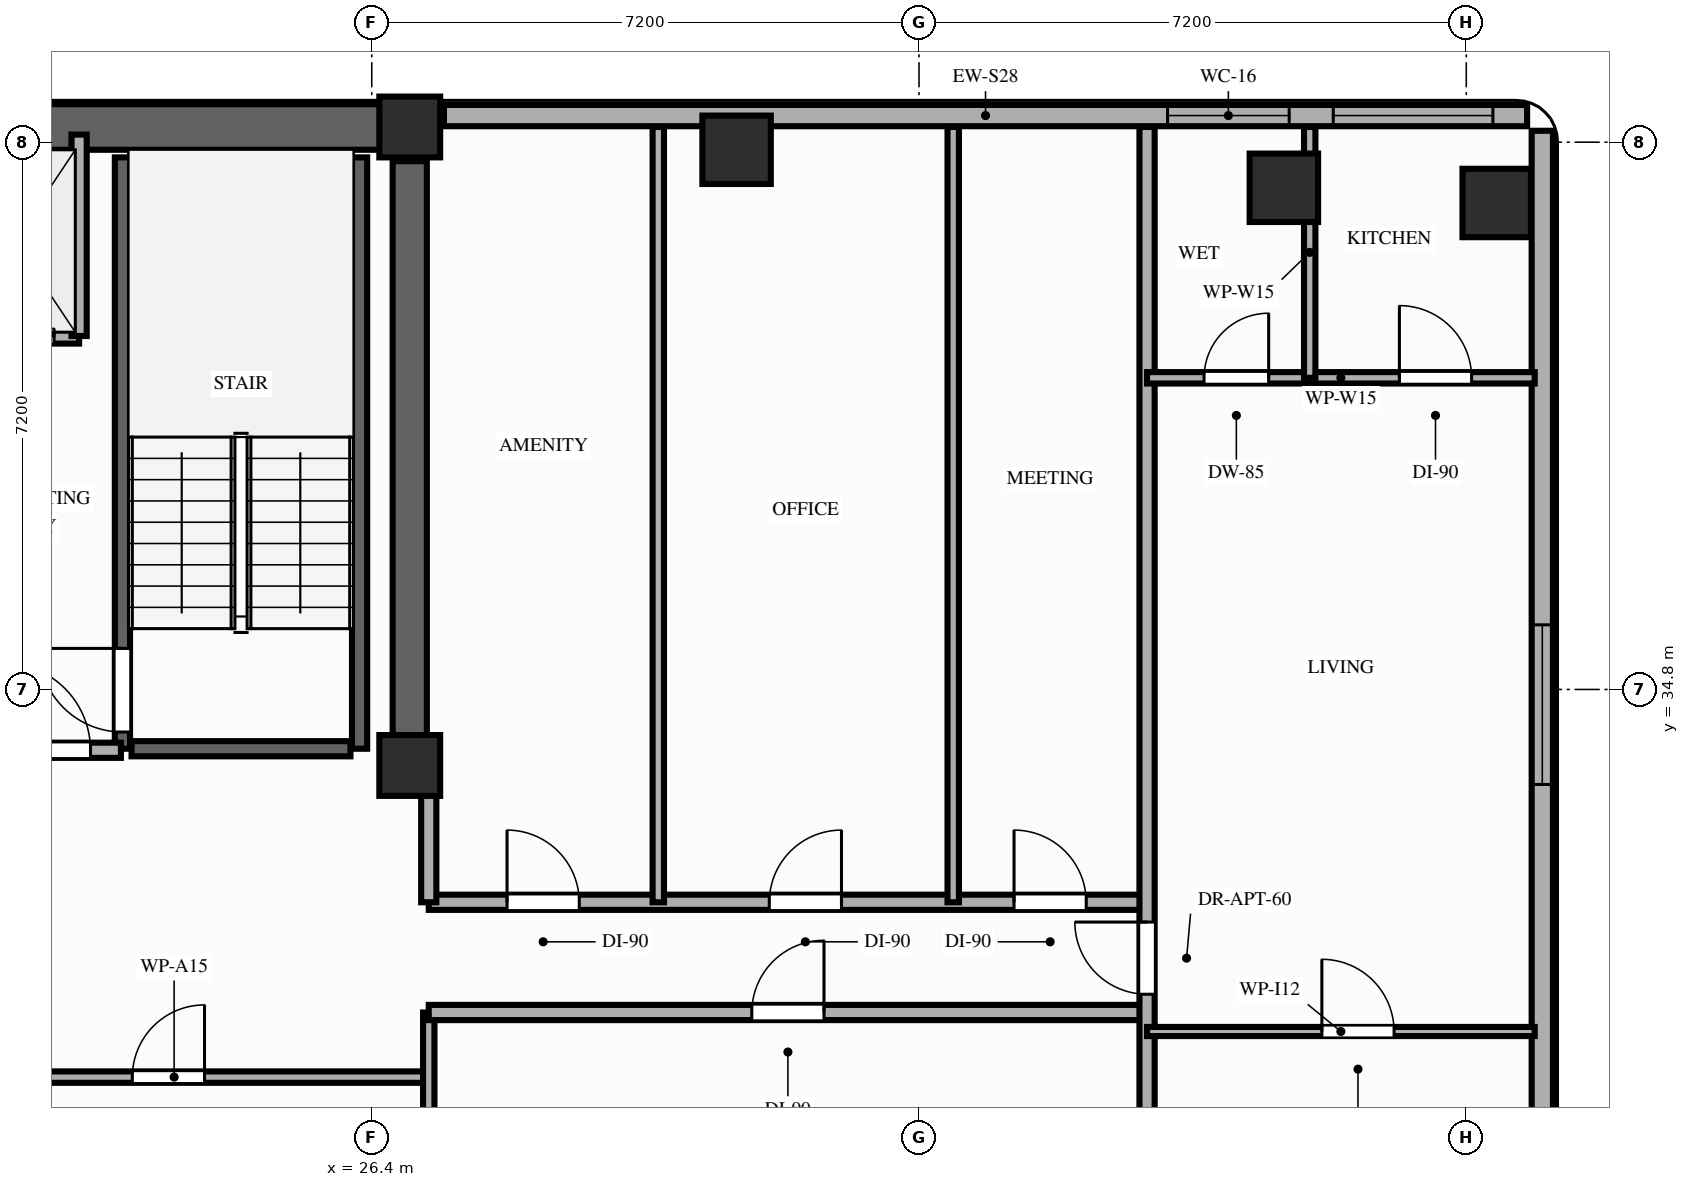
"""IFC4 building model, lengths in metres.
Left out: names, types, materials, properties, quantities, classifications, styles, units other than length and angle.
Written with IfcOpenShell. Run it as: python <this file> out.ifc"""

import sys

from ifc_helpers import new_model, si_unit, direction, frame, frame_2d, origin, origin_2d, place, context, subcontext, project, spatial, rectangle, extrude, element, fill, save


model = new_model("IFC4")
c1 = context("Model", 3, precision=1e-05, world=origin(), true_north=direction((0.0, 1.0)))
c2 = subcontext(c1, "Body", "Model", "MODEL_VIEW")
j1 = project(units=[si_unit("LENGTHUNIT", "METRE"), si_unit("PLANEANGLEUNIT", "RADIAN")], contexts=[c1])
p1 = place(None, origin())
s1 = spatial("IfcSite", under=j1, at=p1, CompositionType="ELEMENT")
p2 = place(p1, origin())
s2 = spatial("IfcBuilding", under=s1, at=p2, CompositionType="ELEMENT")
p3 = place(p2, frame((0.0, 0.0, 198.4)))
s3 = spatial("IfcBuildingStorey", under=s2, at=p3, CompositionType="ELEMENT", Elevation=198.4)
for number, where, z_axis, x_axis in (
    (1, (26.9, 33.8, 0.0), (0.0, 0.0, 1.0), (1.0, 0.0, 0.0)),
    (2, (26.9, 42.2, 0.0), (0.0, 0.0, 1.0), (1.0, 0.0, 0.0)),
):
    element("IfcColumn", number, at=place(p3, frame(where, z_axis=z_axis, x_axis=x_axis)), inside=s3, PredefinedType="COLUMN", context=c2, shape_type="SweptSolid", body=[
        extrude(rectangle(XDim=0.8, YDim=0.8, at=origin_2d()), origin(), (0.0, 0.0, 1.0), 3.2),
    ])
for number, where, z_axis, x_axis in (
    (3, (31.2, 41.9, 0.0), (0.0, 0.0, 1.0), (1.0, 0.0, 0.0)),
    (4, (38.4, 41.4, 0.0), (0.0, 0.0, 1.0), (1.0, 0.0, 0.0)),
    (5, (41.2, 41.2, 0.0), (0.0, 0.0, 1.0), (1.0, 0.0, 0.0)),
):
    element("IfcColumn", number, at=place(p3, frame(where, z_axis=z_axis, x_axis=x_axis)), inside=s3, PredefinedType="COLUMN", context=c2, shape_type="SweptSolid", body=[
        extrude(rectangle(XDim=0.9, YDim=0.9, at=origin_2d()), origin(), (0.0, 0.0, 1.0), 3.2),
    ])
p4 = place(p3, frame((41.6, 42.35, 0.0), z_axis=(0.0, 0.0, 1.0), x_axis=(-1.0, 0.0, 0.0)))
e6 = element("IfcWall", 6, at=p4, inside=s3, PredefinedType="STANDARD", context=c2, shape_type="SweptSolid", body=[
    extrude(rectangle(XDim=14.25, YDim=0.28, at=frame_2d((7.125, 0.0))), origin(), (0.0, 0.0, 1.0), 2.51),
])
p5 = place(p4, frame((3.13, 0.0, 0.85)))
e7 = element("IfcOpeningElement", 7, at=p5, cuts=e6, PredefinedType="OPENING", context=c2, shape_type="SweptSolid", body=[
    extrude(rectangle(XDim=1.6, YDim=1.41, at=frame_2d((0.8, 0.705))), frame((0.0, 0.15, 0.0), z_axis=(0.0, -1.0, 0.0), x_axis=(1.0, 0.0, 0.0)), (0.0, 0.0, 1.0), 0.3),
])
p6 = place(p4, frame((0.45, 0.0, 0.85)))
e8 = element("IfcOpeningElement", 8, at=p6, cuts=e6, PredefinedType="OPENING", context=c2, shape_type="SweptSolid", body=[
    extrude(rectangle(XDim=2.1, YDim=1.41, at=frame_2d((1.05, 0.705))), frame((0.0, 0.15, 0.0), z_axis=(0.0, -1.0, 0.0), x_axis=(1.0, 0.0, 0.0)), (0.0, 0.0, 1.0), 0.3),
])
p7 = place(p3, frame((41.8, 26.8, 0.0), z_axis=(0.0, 0.0, 1.0), x_axis=(0.0, 1.0, 0.0)))
e9 = element("IfcWall", 9, at=p7, inside=s3, PredefinedType="STANDARD", context=c2, shape_type="SweptSolid", body=[
    extrude(rectangle(XDim=15.35, YDim=0.28, at=frame_2d((7.675, 0.0))), origin(), (0.0, 0.0, 1.0), 3.02),
])
p8 = place(p7, frame((6.75, 0.0, 0.85)))
e10 = element("IfcOpeningElement", 10, at=p8, cuts=e9, PredefinedType="OPENING", context=c2, shape_type="SweptSolid", body=[
    extrude(rectangle(XDim=2.1, YDim=1.8, at=frame_2d((1.05, 0.9))), frame((0.0, 0.15, 0.0), z_axis=(0.0, -1.0, 0.0), x_axis=(1.0, 0.0, 0.0)), (0.0, 0.0, 1.0), 0.3),
])
p9 = place(p3, frame((6.45, 42.2, 0.0), z_axis=(0.0, 0.0, 1.0), x_axis=(1.0, 0.0, 0.0)))
e11 = element("IfcWall", 11, at=p9, inside=s3, PredefinedType="SHEAR", context=c2, shape_type="SweptSolid", body=[
    extrude(rectangle(XDim=20.45, YDim=0.6, at=frame_2d((10.225, 0.0))), origin(), (0.0, 0.0, 1.0), 3.02),
])
p10 = place(p3, frame((26.9, 33.8, 0.0), z_axis=(0.0, 0.0, 1.0), x_axis=(0.0, 1.0, 0.0)))
e12 = element("IfcWall", 12, at=p10, inside=s3, PredefinedType="SHEAR", context=c2, shape_type="SweptSolid", body=[
    extrude(rectangle(XDim=7.95, YDim=0.45, at=frame_2d((3.975, 0.0))), origin(), (0.0, 0.0, 1.0), 3.02),
])
p11 = place(p3, frame((23.12, 34.02, 0.0), z_axis=(0.0, 0.0, 1.0), x_axis=(0.0, 1.0, 0.0)))
e13 = element("IfcWall", 13, at=p11, inside=s3, PredefinedType="SHEAR", context=c2, shape_type="SweptSolid", body=[
    extrude(rectangle(XDim=7.78, YDim=0.2, at=frame_2d((3.89, 0.0))), origin(), (0.0, 0.0, 1.0), 3.02),
])
p12 = place(p11, frame((0.22, 0.0, 0.0)))
e14 = element("IfcOpeningElement", 14, at=p12, cuts=e13, PredefinedType="OPENING", context=c2, shape_type="SweptSolid", body=[
    extrude(rectangle(XDim=1.1, YDim=2.15, at=frame_2d((0.55, 1.075))), frame((0.0, 0.11, 0.0), z_axis=(0.0, -1.0, 0.0), x_axis=(1.0, 0.0, 0.0)), (0.0, 0.0, 1.0), 0.22),
])
p13 = place(p3, frame((26.24, 34.02, 0.0), z_axis=(0.0, 0.0, 1.0), x_axis=(0.0, 1.0, 0.0)))
e15 = element("IfcWall", 15, at=p13, inside=s3, PredefinedType="SHEAR", context=c2, shape_type="SweptSolid", body=[
    extrude(rectangle(XDim=7.78, YDim=0.2, at=frame_2d((3.89, 0.0))), origin(), (0.0, 0.0, 1.0), 3.02),
])
p14 = place(p3, frame((23.24, 34.02, 0.0), z_axis=(0.0, 0.0, 1.0), x_axis=(1.0, 0.0, 0.0)))
e16 = element("IfcWall", 16, at=p14, inside=s3, PredefinedType="SHEAR", context=c2, shape_type="SweptSolid", body=[
    extrude(rectangle(XDim=2.88, YDim=0.2, at=frame_2d((1.44, 0.0))), origin(), (0.0, 0.0, 1.0), 3.02),
])
p15 = place(p3, frame((20.85, 39.45, 0.0), z_axis=(0.0, 0.0, 1.0), x_axis=(1.0, 0.0, 0.0)))
e17 = element("IfcWall", 17, at=p15, inside=s3, PredefinedType="MOVABLE", context=c2, shape_type="SweptSolid", body=[
    extrude(rectangle(XDim=1.7, YDim=0.2, at=frame_2d((0.85, 0.0))), origin(), (0.0, 0.0, 1.0), 3.02),
])
p16 = place(p15, frame((0.32, 0.0, 0.0)))
e18 = element("IfcOpeningElement", 18, at=p16, cuts=e17, PredefinedType="OPENING", context=c2, shape_type="SweptSolid", body=[
    extrude(rectangle(XDim=1.05, YDim=2.15, at=frame_2d((0.525, 1.075))), frame((0.0, 0.11, 0.0), z_axis=(0.0, -1.0, 0.0), x_axis=(1.0, 0.0, 0.0)), (0.0, 0.0, 1.0), 0.22),
])
p17 = place(p3, frame((22.55, 39.45, 0.0), z_axis=(0.0, 0.0, 1.0), x_axis=(0.0, 1.0, 0.0)))
e19 = element("IfcWall", 19, at=p17, inside=s3, PredefinedType="MOVABLE", context=c2, shape_type="SweptSolid", body=[
    extrude(rectangle(XDim=2.65, YDim=0.2, at=frame_2d((1.325, 0.0))), origin(), (0.0, 0.0, 1.0), 2.51),
])
p18 = place(p3, frame((20.5, 34.0, 0.0), z_axis=(0.0, 0.0, 1.0), x_axis=(1.0, 0.0, 0.0)))
e20 = element("IfcWall", 20, at=p18, inside=s3, PredefinedType="PARTITIONING", context=c2, shape_type="SweptSolid", body=[
    extrude(rectangle(XDim=2.6, YDim=0.2, at=frame_2d((1.3, 0.0))), origin(), (0.0, 0.0, 1.0), 2.51),
])
p19 = place(p18, frame((1.05, 0.0, 0.0)))
e21 = element("IfcOpeningElement", 21, at=p19, cuts=e20, PredefinedType="OPENING", context=c2, shape_type="SweptSolid", body=[
    extrude(rectangle(XDim=1.15, YDim=2.15, at=frame_2d((0.575, 1.075))), frame((0.0, 0.11, 0.0), z_axis=(0.0, -1.0, 0.0), x_axis=(1.0, 0.0, 0.0)), (0.0, 0.0, 1.0), 0.22),
])
p20 = place(p3, frame((20.45, 29.7, 0.0), z_axis=(0.0, 0.0, 1.0), x_axis=(1.0, 0.0, 0.0)))
e22 = element("IfcWall", 22, at=p20, inside=s3, PredefinedType="PARTITIONING", context=c2, shape_type="SweptSolid", body=[
    extrude(rectangle(XDim=6.7, YDim=0.15, at=frame_2d((3.35, 0.0))), origin(), (0.0, 0.0, 1.0), 3.02),
])
p21 = place(p20, frame((2.8, 0.0, 0.0)))
e23 = element("IfcOpeningElement", 23, at=p21, cuts=e22, PredefinedType="OPENING", context=c2, shape_type="SweptSolid", body=[
    extrude(rectangle(XDim=0.95, YDim=2.15, at=frame_2d((0.475, 1.075))), frame((0.0, 0.085, 0.0), z_axis=(0.0, -1.0, 0.0), x_axis=(1.0, 0.0, 0.0)), (0.0, 0.0, 1.0), 0.17),
])
p22 = place(p3, frame((27.15, 26.75, 0.0), z_axis=(0.0, 0.0, 1.0), x_axis=(0.0, 1.0, 0.0)))
e24 = element("IfcWall", 24, at=p22, inside=s3, PredefinedType="PARTITIONING", context=c2, shape_type="SweptSolid", body=[
    extrude(rectangle(XDim=3.8, YDim=0.15, at=frame_2d((1.9, 0.0))), origin(), (0.0, 0.0, 1.0), 2.51),
])
p23 = place(p3, frame((27.15, 30.55, 0.0), z_axis=(0.0, 0.0, 1.0), x_axis=(1.0, 0.0, 0.0)))
e25 = element("IfcWall", 25, at=p23, inside=s3, PredefinedType="PARTITIONING", context=c2, shape_type="SweptSolid", body=[
    extrude(rectangle(XDim=9.45, YDim=0.2, at=frame_2d((4.725, 0.0))), origin(), (0.0, 0.0, 1.0), 2.51),
])
p24 = place(p23, frame((4.25, 0.0, 0.0)))
e26 = element("IfcOpeningElement", 26, at=p24, cuts=e25, PredefinedType="OPENING", context=c2, shape_type="SweptSolid", body=[
    extrude(rectangle(XDim=0.95, YDim=2.15, at=frame_2d((0.475, 1.075))), frame((0.0, 0.11, 0.0), z_axis=(0.0, -1.0, 0.0), x_axis=(1.0, 0.0, 0.0)), (0.0, 0.0, 1.0), 0.22),
])
p25 = place(p3, frame((27.15, 32.0, 0.0), z_axis=(0.0, 0.0, 1.0), x_axis=(1.0, 0.0, 0.0)))
e27 = element("IfcWall", 27, at=p25, inside=s3, PredefinedType="PARTITIONING", context=c2, shape_type="SweptSolid", body=[
    extrude(rectangle(XDim=9.45, YDim=0.2, at=frame_2d((4.725, 0.0))), origin(), (0.0, 0.0, 1.0), 2.51),
])
p26 = place(p25, frame((1.03, 0.0, 0.0)))
e28 = element("IfcOpeningElement", 28, at=p26, cuts=e27, PredefinedType="OPENING", context=c2, shape_type="SweptSolid", body=[
    extrude(rectangle(XDim=0.95, YDim=2.15, at=frame_2d((0.475, 1.075))), frame((0.0, 0.11, 0.0), z_axis=(0.0, -1.0, 0.0), x_axis=(1.0, 0.0, 0.0)), (0.0, 0.0, 1.0), 0.22),
])
p27 = place(p25, frame((4.48, 0.0, 0.0)))
e29 = element("IfcOpeningElement", 29, at=p27, cuts=e27, PredefinedType="OPENING", context=c2, shape_type="SweptSolid", body=[
    extrude(rectangle(XDim=0.95, YDim=2.15, at=frame_2d((0.475, 1.075))), frame((0.0, 0.11, 0.0), z_axis=(0.0, -1.0, 0.0), x_axis=(1.0, 0.0, 0.0)), (0.0, 0.0, 1.0), 0.22),
])
p28 = place(p25, frame((7.7, 0.0, 0.0)))
e30 = element("IfcOpeningElement", 30, at=p28, cuts=e27, PredefinedType="OPENING", context=c2, shape_type="SweptSolid", body=[
    extrude(rectangle(XDim=0.95, YDim=2.15, at=frame_2d((0.475, 1.075))), frame((0.0, 0.11, 0.0), z_axis=(0.0, -1.0, 0.0), x_axis=(1.0, 0.0, 0.0)), (0.0, 0.0, 1.0), 0.22),
])
p29 = place(p3, frame((27.15, 32.0, 0.0), z_axis=(0.0, 0.0, 1.0), x_axis=(0.0, 1.0, 0.0)))
e31 = element("IfcWall", 31, at=p29, inside=s3, PredefinedType="PARTITIONING", context=c2, shape_type="SweptSolid", body=[
    extrude(rectangle(XDim=1.68, YDim=0.2, at=frame_2d((0.84, 0.0))), origin(), (0.0, 0.0, 1.0), 2.51),
])
p30 = place(p3, frame((36.6, 26.75, 0.0), z_axis=(0.0, 0.0, 1.0), x_axis=(0.0, 1.0, 0.0)))
e32 = element("IfcWall", 32, at=p30, inside=s3, PredefinedType="PARTITIONING", context=c2, shape_type="SweptSolid", body=[
    extrude(rectangle(XDim=15.45, YDim=0.2, at=frame_2d((7.725, 0.0))), origin(), (0.0, 0.0, 1.0), 2.51),
])
p31 = place(p30, frame((4.04, 0.0, 0.0)))
e33 = element("IfcOpeningElement", 33, at=p31, cuts=e32, PredefinedType="OPENING", context=c2, shape_type="SweptSolid", body=[
    extrude(rectangle(XDim=0.95, YDim=2.15, at=frame_2d((0.475, 1.075))), frame((0.0, 0.11, 0.0), z_axis=(0.0, -1.0, 0.0), x_axis=(1.0, 0.0, 0.0)), (0.0, 0.0, 1.0), 0.22),
])
p32 = place(p3, frame((36.6, 30.3, 0.0), z_axis=(0.0, 0.0, 1.0), x_axis=(1.0, 0.0, 0.0)))
e34 = element("IfcWall", 34, at=p32, inside=s3, PredefinedType="PARTITIONING", context=c2, shape_type="SweptSolid", body=[
    extrude(rectangle(XDim=5.1, YDim=0.12, at=frame_2d((2.55, 0.0))), origin(), (0.0, 0.0, 1.0), 2.51),
])
p33 = place(p32, frame((2.3, 0.0, 0.0)))
e35 = element("IfcOpeningElement", 35, at=p33, cuts=e34, PredefinedType="OPENING", context=c2, shape_type="SweptSolid", body=[
    extrude(rectangle(XDim=0.95, YDim=2.15, at=frame_2d((0.475, 1.075))), frame((0.0, 0.07, 0.0), z_axis=(0.0, -1.0, 0.0), x_axis=(1.0, 0.0, 0.0)), (0.0, 0.0, 1.0), 0.14),
])
p34 = place(p3, frame((36.6, 38.9, 0.0), z_axis=(0.0, 0.0, 1.0), x_axis=(1.0, 0.0, 0.0)))
e36 = element("IfcWall", 36, at=p34, inside=s3, PredefinedType="PARTITIONING", context=c2, shape_type="SweptSolid", body=[
    extrude(rectangle(XDim=5.1, YDim=0.15, at=frame_2d((2.55, 0.0))), origin(), (0.0, 0.0, 1.0), 2.51),
])
p35 = place(p34, frame((0.75, 0.0, 0.0)))
e37 = element("IfcOpeningElement", 37, at=p35, cuts=e36, PredefinedType="OPENING", context=c2, shape_type="SweptSolid", body=[
    extrude(rectangle(XDim=0.85, YDim=2.1, at=frame_2d((0.425, 1.05))), frame((0.0, 0.085, 0.0), z_axis=(0.0, -1.0, 0.0), x_axis=(1.0, 0.0, 0.0)), (0.0, 0.0, 1.0), 0.17),
])
p36 = place(p34, frame((3.32, 0.0, 0.0)))
e38 = element("IfcOpeningElement", 38, at=p36, cuts=e36, PredefinedType="OPENING", context=c2, shape_type="SweptSolid", body=[
    extrude(rectangle(XDim=0.95, YDim=2.15, at=frame_2d((0.475, 1.075))), frame((0.0, 0.085, 0.0), z_axis=(0.0, -1.0, 0.0), x_axis=(1.0, 0.0, 0.0)), (0.0, 0.0, 1.0), 0.17),
])
p37 = place(p3, frame((38.74, 38.9, 0.0), z_axis=(0.0, 0.0, 1.0), x_axis=(0.0, 1.0, 0.0)))
e39 = element("IfcWall", 39, at=p37, inside=s3, PredefinedType="PARTITIONING", context=c2, shape_type="SweptSolid", body=[
    extrude(rectangle(XDim=3.3, YDim=0.15, at=frame_2d((1.65, 0.0))), origin(), (0.0, 0.0, 1.0), 2.51),
])
for number, where, z_axis, x_axis in (
    (40, (30.17, 32.0, 0.0), (0.0, 0.0, 1.0), (0.0, 1.0, 0.0)),
    (41, (34.05, 32.0, 0.0), (0.0, 0.0, 1.0), (0.0, 1.0, 0.0)),
):
    element("IfcWall", number, at=place(p3, frame(where, z_axis=z_axis, x_axis=x_axis)), inside=s3, PredefinedType="PARTITIONING", context=c2, shape_type="SweptSolid", body=[
        extrude(rectangle(XDim=10.2, YDim=0.15, at=frame_2d((5.1, 0.0))), origin(), (0.0, 0.0, 1.0), 2.51),
    ])
p38 = place(p8, origin())
e42 = element("IfcWindow", 42, at=p38, inside=s3, PartitioningType="SINGLE_PANEL", PredefinedType="WINDOW", context=c2, shape_type="SweptSolid", body=[
    extrude(rectangle(XDim=2.1, YDim=1.8, at=frame_2d((1.05, 0.9))), frame((0.0, 0.03, 0.0), z_axis=(0.0, -1.0, 0.0), x_axis=(1.0, 0.0, 0.0)), (0.0, 0.0, 1.0), 0.06),
])
fill(e10, e42)
p39 = place(p5, origin())
e43 = element("IfcWindow", 43, at=p39, inside=s3, PartitioningType="SINGLE_PANEL", PredefinedType="WINDOW", context=c2, shape_type="SweptSolid", body=[
    extrude(rectangle(XDim=1.6, YDim=1.41, at=frame_2d((0.8, 0.705))), frame((0.0, 0.03, 0.0), z_axis=(0.0, -1.0, 0.0), x_axis=(1.0, 0.0, 0.0)), (0.0, 0.0, 1.0), 0.06),
])
fill(e7, e43)
p40 = place(p6, origin())
e44 = element("IfcWindow", 44, at=p40, inside=s3, PartitioningType="SINGLE_PANEL", PredefinedType="WINDOW", context=c2, shape_type="SweptSolid", body=[
    extrude(rectangle(XDim=2.1, YDim=1.41, at=frame_2d((1.05, 0.705))), frame((0.0, 0.03, 0.0), z_axis=(0.0, -1.0, 0.0), x_axis=(1.0, 0.0, 0.0)), (0.0, 0.0, 1.0), 0.06),
])
fill(e8, e44)
p41 = place(p12, origin())
e45 = element("IfcDoor", 45, at=p41, inside=s3, OperationType="SINGLE_SWING_RIGHT", PredefinedType="DOOR", context=c2, shape_type="SweptSolid", body=[
    extrude(rectangle(XDim=1.1, YDim=2.15, at=frame_2d((0.55, 1.075))), frame((0.0, 0.025, 0.0), z_axis=(0.0, -1.0, 0.0), x_axis=(1.0, 0.0, 0.0)), (0.0, 0.0, 1.0), 0.05),
])
fill(e14, e45)
p42 = place(p16, origin())
e46 = element("IfcDoor", 46, at=p42, inside=s3, OperationType="SLIDING_TO_LEFT", PredefinedType="DOOR", context=c2, shape_type="SweptSolid", body=[
    extrude(rectangle(XDim=1.05, YDim=2.15, at=frame_2d((0.525, 1.075))), frame((0.0, 0.025, 0.0), z_axis=(0.0, -1.0, 0.0), x_axis=(1.0, 0.0, 0.0)), (0.0, 0.0, 1.0), 0.05),
])
fill(e18, e46)
p43 = place(p19, origin())
e47 = element("IfcDoor", 47, at=p43, inside=s3, OperationType="SINGLE_SWING_LEFT", PredefinedType="DOOR", context=c2, shape_type="SweptSolid", body=[
    extrude(rectangle(XDim=1.15, YDim=2.15, at=frame_2d((0.575, 1.075))), frame((0.0, 0.025, 0.0), z_axis=(0.0, -1.0, 0.0), x_axis=(1.0, 0.0, 0.0)), (0.0, 0.0, 1.0), 0.05),
])
fill(e21, e47)
p44 = place(p21, origin())
e48 = element("IfcDoor", 48, at=p44, inside=s3, OperationType="SINGLE_SWING_RIGHT", PredefinedType="DOOR", context=c2, shape_type="SweptSolid", body=[
    extrude(rectangle(XDim=0.95, YDim=2.15, at=frame_2d((0.475, 1.075))), frame((0.0, 0.025, 0.0), z_axis=(0.0, -1.0, 0.0), x_axis=(1.0, 0.0, 0.0)), (0.0, 0.0, 1.0), 0.05),
])
fill(e23, e48)
p45 = place(p31, origin())
e49 = element("IfcDoor", 49, at=p45, inside=s3, OperationType="SINGLE_SWING_RIGHT", PredefinedType="DOOR", context=c2, shape_type="SweptSolid", body=[
    extrude(rectangle(XDim=0.95, YDim=2.15, at=frame_2d((0.475, 1.075))), frame((0.0, 0.025, 0.0), z_axis=(0.0, -1.0, 0.0), x_axis=(1.0, 0.0, 0.0)), (0.0, 0.0, 1.0), 0.05),
])
fill(e33, e49)
p46 = place(p33, origin())
e50 = element("IfcDoor", 50, at=p46, inside=s3, OperationType="SINGLE_SWING_LEFT", PredefinedType="DOOR", context=c2, shape_type="SweptSolid", body=[
    extrude(rectangle(XDim=0.95, YDim=2.15, at=frame_2d((0.475, 1.075))), frame((0.0, 0.025, 0.0), z_axis=(0.0, -1.0, 0.0), x_axis=(1.0, 0.0, 0.0)), (0.0, 0.0, 1.0), 0.05),
])
fill(e35, e50)
p47 = place(p35, origin())
e51 = element("IfcDoor", 51, at=p47, inside=s3, OperationType="SINGLE_SWING_RIGHT", PredefinedType="DOOR", context=c2, shape_type="SweptSolid", body=[
    extrude(rectangle(XDim=0.85, YDim=2.1, at=frame_2d((0.425, 1.05))), frame((0.0, 0.025, 0.0), z_axis=(0.0, -1.0, 0.0), x_axis=(1.0, 0.0, 0.0)), (0.0, 0.0, 1.0), 0.05),
])
fill(e37, e51)
p48 = place(p36, origin())
e52 = element("IfcDoor", 52, at=p48, inside=s3, OperationType="SINGLE_SWING_LEFT", PredefinedType="DOOR", context=c2, shape_type="SweptSolid", body=[
    extrude(rectangle(XDim=0.95, YDim=2.15, at=frame_2d((0.475, 1.075))), frame((0.0, 0.025, 0.0), z_axis=(0.0, -1.0, 0.0), x_axis=(1.0, 0.0, 0.0)), (0.0, 0.0, 1.0), 0.05),
])
fill(e38, e52)
p49 = place(p24, origin())
e53 = element("IfcDoor", 53, at=p49, inside=s3, OperationType="SINGLE_SWING_RIGHT", PredefinedType="DOOR", context=c2, shape_type="SweptSolid", body=[
    extrude(rectangle(XDim=0.95, YDim=2.15, at=frame_2d((0.475, 1.075))), frame((0.0, 0.025, 0.0), z_axis=(0.0, -1.0, 0.0), x_axis=(1.0, 0.0, 0.0)), (0.0, 0.0, 1.0), 0.05),
])
fill(e26, e53)
p50 = place(p26, origin())
e54 = element("IfcDoor", 54, at=p50, inside=s3, OperationType="SINGLE_SWING_LEFT", PredefinedType="DOOR", context=c2, shape_type="SweptSolid", body=[
    extrude(rectangle(XDim=0.95, YDim=2.15, at=frame_2d((0.475, 1.075))), frame((0.0, 0.025, 0.0), z_axis=(0.0, -1.0, 0.0), x_axis=(1.0, 0.0, 0.0)), (0.0, 0.0, 1.0), 0.05),
])
fill(e28, e54)
p51 = place(p27, origin())
e55 = element("IfcDoor", 55, at=p51, inside=s3, OperationType="SINGLE_SWING_RIGHT", PredefinedType="DOOR", context=c2, shape_type="SweptSolid", body=[
    extrude(rectangle(XDim=0.95, YDim=2.15, at=frame_2d((0.475, 1.075))), frame((0.0, 0.025, 0.0), z_axis=(0.0, -1.0, 0.0), x_axis=(1.0, 0.0, 0.0)), (0.0, 0.0, 1.0), 0.05),
])
fill(e29, e55)
p52 = place(p28, origin())
e56 = element("IfcDoor", 56, at=p52, inside=s3, OperationType="SINGLE_SWING_LEFT", PredefinedType="DOOR", context=c2, shape_type="SweptSolid", body=[
    extrude(rectangle(XDim=0.95, YDim=2.15, at=frame_2d((0.475, 1.075))), frame((0.0, 0.025, 0.0), z_axis=(0.0, -1.0, 0.0), x_axis=(1.0, 0.0, 0.0)), (0.0, 0.0, 1.0), 0.05),
])
fill(e30, e56)
save(model, sys.argv[1])
